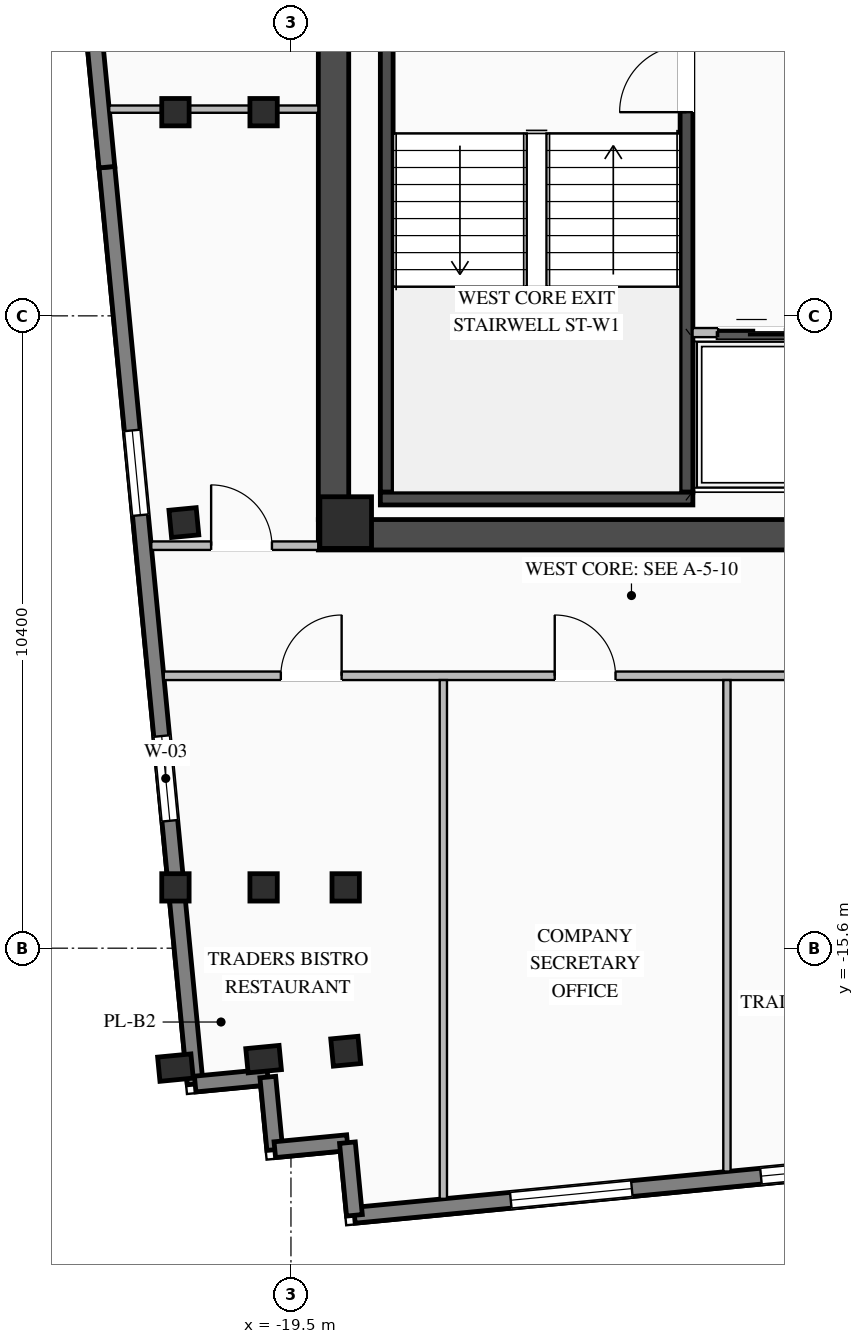
"""IFC4 building model, lengths in metres.
Left out: names, types, materials, properties, quantities, classifications, styles, units other than length and angle.
Written with IfcOpenShell. Run it as: python <this file> out.ifc"""

import sys

from ifc_helpers import new_model, si_unit, direction, frame, frame_2d, origin, origin_2d, place, context, subcontext, project, spatial, rectangle, i_section, extrude, element, fill, save


model = new_model("IFC4")
c1 = context("Model", 3, precision=1e-05, world=origin(), true_north=direction((0.0, 1.0)))
c2 = subcontext(c1, "Body", "Model", "MODEL_VIEW")
j1 = project(units=[si_unit("LENGTHUNIT", "METRE"), si_unit("PLANEANGLEUNIT", "RADIAN")], contexts=[c1])
p1 = place(None, origin())
s1 = spatial("IfcSite", under=j1, at=p1, CompositionType="ELEMENT")
p2 = place(p1, origin())
s2 = spatial("IfcBuilding", under=s1, at=p2, CompositionType="ELEMENT")
p3 = place(p2, frame((0.0, 0.0, 272.4)))
s3 = spatial("IfcBuildingStorey", under=s2, at=p3, CompositionType="ELEMENT", Elevation=272.4)
p4 = place(p3, frame((-19.05, -8.8, 0.0), z_axis=(0.0, 0.0, 1.0), x_axis=(1.0, 0.0, 0.0)))
e1 = element("IfcWall", 1, at=p4, inside=s3, PredefinedType="SHEAR", context=c2, shape_type="SweptSolid", body=[
    extrude(rectangle(XDim=10.25, YDim=0.5, at=frame_2d((5.125, 0.0))), origin(), (0.0, 0.0, 1.0), 3.27),
])
p5 = place(p3, frame((-18.8, -8.55, 0.0), z_axis=(0.0, 0.0, 1.0), x_axis=(0.0, 1.0, 0.0)))
e2 = element("IfcWall", 2, at=p5, inside=s3, PredefinedType="SHEAR", context=c2, shape_type="SweptSolid", body=[
    extrude(rectangle(XDim=17.1, YDim=0.5, at=frame_2d((8.55, 0.0))), origin(), (0.0, 0.0, 1.0), 3.27),
])
p6 = place(p3, frame((-12.995, -8.1, 0.0), z_axis=(0.0, 0.0, 1.0), x_axis=(0.0, 1.0, 0.0)))
e3 = element("IfcWall", 3, at=p6, inside=s3, PredefinedType="SHEAR", context=c2, shape_type="SweptSolid", body=[
    extrude(rectangle(XDim=8.2, YDim=0.21, at=frame_2d((4.1, 0.0))), origin(), (0.0, 0.0, 1.0), 3.27),
])
p7 = place(p6, frame((6.25, 0.0, 0.0)))
e4 = element("IfcOpeningElement", 4, at=p7, cuts=e3, PredefinedType="OPENING", context=c2, shape_type="SweptSolid", body=[
    extrude(rectangle(XDim=1.1, YDim=2.15, at=frame_2d((0.55, 1.075))), frame((0.0, 0.115, 0.0), z_axis=(0.0, -1.0, 0.0), x_axis=(1.0, 0.0, 0.0)), (0.0, 0.0, 1.0), 0.23),
])
p8 = place(p3, frame((-17.925, -8.1, 0.0), z_axis=(0.0, 0.0, 1.0), x_axis=(0.0, 1.0, 0.0)))
e5 = element("IfcWall", 5, at=p8, inside=s3, PredefinedType="SHEAR", context=c2, shape_type="SweptSolid", body=[
    extrude(rectangle(XDim=8.2, YDim=0.21, at=frame_2d((4.1, 0.0))), origin(), (0.0, 0.0, 1.0), 3.27),
])
p9 = place(p3, frame((-18.03, -8.205, 0.0), z_axis=(0.0, 0.0, 1.0), x_axis=(1.0, 0.0, 0.0)))
e6 = element("IfcWall", 6, at=p9, inside=s3, PredefinedType="SHEAR", context=c2, shape_type="SweptSolid", body=[
    extrude(rectangle(XDim=5.14, YDim=0.21, at=frame_2d((2.57, 0.0))), origin(), (0.0, 0.0, 1.0), 3.27),
])
p10 = place(p3, frame((-18.6, -8.6, 0.0), z_axis=(0.0, 0.0, 1.0), x_axis=(1.0, 0.0, 0.0)))
e7 = element("IfcColumn", 7, at=p10, inside=s3, PredefinedType="COLUMN", context=c2, shape_type="SweptSolid", body=[
    extrude(rectangle(XDim=0.85, YDim=0.85, at=origin_2d()), origin(), (0.0, 0.0, 1.0), 3.45),
])
for number, where, z_axis, x_axis in (
    (8, (-21.4, -14.6, 0.0), (0.0, 0.0, 1.0), (1.0, 0.0, 0.0)),
    (9, (-19.95, -14.6, 0.0), (0.0, 0.0, 1.0), (1.0, 0.0, 0.0)),
    (10, (-18.6, -14.6, 0.0), (0.0, 0.0, 1.0), (1.0, 0.0, 0.0)),
    (11, (-21.4, -1.85, 0.0), (0.0, 0.0, 1.0), (1.0, 0.0, 0.0)),
    (12, (-19.95, -1.85, 0.0), (0.0, 0.0, 1.0), (1.0, 0.0, 0.0)),
    (13, (-18.6, -17.295, 0.0), (0.0, 0.0, 1.0), (0.995, 0.096, 0.0)),
    (14, (-21.261, -8.6, 0.0), (0.0, 0.0, 1.0), (0.995, 0.096, 0.0)),
):
    element("IfcColumn", number, at=place(p3, frame(where, z_axis=z_axis, x_axis=x_axis)), inside=s3, PredefinedType="COLUMN", context=c2, shape_type="SweptSolid", body=[
        extrude(i_section(OverallWidth=0.45, OverallDepth=0.45, WebThickness=0.022, FlangeThickness=0.032, at=origin_2d()), origin(), (0.0, 0.0, 1.0), 3.45),
    ])
for number, where, z_axis, x_axis in (
    (15, (-21.4, -17.564, 0.0), (0.0, 0.0, 1.0), (0.995, 0.096, 0.0)),
    (16, (-19.95, -17.425, 0.0), (0.0, 0.0, 1.0), (0.995, 0.096, 0.0)),
):
    element("IfcColumn", number, at=place(p3, frame(where, z_axis=z_axis, x_axis=x_axis)), inside=s3, PredefinedType="PILASTER", context=c2, shape_type="SweptSolid", body=[
        extrude(rectangle(XDim=0.55, YDim=0.4, at=origin_2d()), origin(), (0.0, 0.0, 1.0), 3.45),
    ])
p11 = place(p3, frame((-7.756, -18.963, 0.0), z_axis=(0.0, 0.0, 1.0), x_axis=(-0.995396745868, -0.095840066339, 0.0)))
e17 = element("IfcWall", 17, at=p11, inside=s3, PredefinedType="STANDARD", context=c2, shape_type="SweptSolid", body=[
    extrude(rectangle(XDim=10.75, YDim=0.26, at=frame_2d((5.375, 0.0))), origin(), (0.0, 0.0, 1.0), 3.25),
])
p12 = place(p11, frame((2.033, 0.0, 0.76)))
e18 = element("IfcOpeningElement", 18, at=p12, cuts=e17, PredefinedType="OPENING", context=c2, shape_type="SweptSolid", body=[
    extrude(rectangle(XDim=2.0, YDim=2.05, at=frame_2d((1.0, 1.025))), frame((0.0, 0.14, 0.0), z_axis=(0.0, -1.0, 0.0), x_axis=(1.0, 0.0, 0.0)), (0.0, 0.0, 1.0), 0.28),
])
p13 = place(p11, frame((6.167, 0.0, 0.76)))
e19 = element("IfcOpeningElement", 19, at=p13, cuts=e17, PredefinedType="OPENING", context=c2, shape_type="SweptSolid", body=[
    extrude(rectangle(XDim=2.0, YDim=2.05, at=frame_2d((1.0, 1.025))), frame((0.0, 0.14, 0.0), z_axis=(0.0, -1.0, 0.0), x_axis=(1.0, 0.0, 0.0)), (0.0, 0.0, 1.0), 0.28),
])
p14 = place(p3, frame((-21.075, -17.834, 0.0), z_axis=(0.0, 0.0, 1.0), x_axis=(-0.095852427869, 0.995395555582, 0.0)))
e20 = element("IfcWall", 20, at=p14, inside=s3, PredefinedType="STANDARD", context=c2, shape_type="SweptSolid", body=[
    extrude(rectangle(XDim=15.15, YDim=0.26, at=frame_2d((7.575, 0.0))), origin(), (0.0, 0.0, 1.0), 2.645),
])
p15 = place(p14, frame((4.35, 0.0, 0.535)))
e21 = element("IfcOpeningElement", 21, at=p15, cuts=e20, PredefinedType="OPENING", context=c2, shape_type="SweptSolid", body=[
    extrude(rectangle(XDim=1.4, YDim=1.95, at=frame_2d((0.7, 0.975))), frame((0.0, 0.14, 0.0), z_axis=(0.0, -1.0, 0.0), x_axis=(1.0, 0.0, 0.0)), (0.0, 0.0, 1.0), 0.28),
])
p16 = place(p14, frame((9.4, 0.0, 0.535)))
e22 = element("IfcOpeningElement", 22, at=p16, cuts=e20, PredefinedType="OPENING", context=c2, shape_type="SweptSolid", body=[
    extrude(rectangle(XDim=1.4, YDim=1.95, at=frame_2d((0.7, 0.975))), frame((0.0, 0.14, 0.0), z_axis=(0.0, -1.0, 0.0), x_axis=(1.0, 0.0, 0.0)), (0.0, 0.0, 1.0), 0.28),
])
p17 = place(p3, frame((-22.527, -2.754, 0.0), z_axis=(0.0, 0.0, 1.0), x_axis=(-0.095850890337, 0.995395703638, 0.0)))
e23 = element("IfcWall", 23, at=p17, inside=s3, PredefinedType="STANDARD", context=c2, shape_type="SweptSolid", body=[
    extrude(rectangle(XDim=15.15, YDim=0.26, at=frame_2d((7.575, 0.0))), origin(), (0.0, 0.0, 1.0), 3.25),
])
p18 = place(p17, frame((4.35, 0.0, 0.76)))
e24 = element("IfcOpeningElement", 24, at=p18, cuts=e23, PredefinedType="OPENING", context=c2, shape_type="SweptSolid", body=[
    extrude(rectangle(XDim=1.4, YDim=1.95, at=frame_2d((0.7, 0.975))), frame((0.0, 0.14, 0.0), z_axis=(0.0, -1.0, 0.0), x_axis=(1.0, 0.0, 0.0)), (0.0, 0.0, 1.0), 0.28),
])
p19 = place(p17, frame((9.4, 0.0, 0.76)))
e25 = element("IfcOpeningElement", 25, at=p19, cuts=e23, PredefinedType="OPENING", context=c2, shape_type="SweptSolid", body=[
    extrude(rectangle(XDim=1.4, YDim=1.95, at=frame_2d((0.7, 0.975))), frame((0.0, 0.14, 0.0), z_axis=(0.0, -1.0, 0.0), x_axis=(1.0, 0.0, 0.0)), (0.0, 0.0, 1.0), 0.28),
])
p20 = place(p3, frame((-21.075, -17.834, 0.0), z_axis=(0.0, 0.0, 1.0), x_axis=(0.995397091755, 0.095836473879, 0.0)))
e26 = element("IfcWall", 26, at=p20, inside=s3, PredefinedType="STANDARD", context=c2, shape_type="SweptSolid", body=[
    extrude(rectangle(XDim=1.2, YDim=0.26, at=frame_2d((0.6, 0.0))), origin(), (0.0, 0.0, 1.0), 2.645),
])
for number, where, z_axis, x_axis in (
    (27, (-19.881, -17.719, 0.0), (0.0, 0.0, 1.0), (0.096, -0.995, 0.0)),
    (28, (-19.766, -18.914, 0.0), (0.0, 0.0, 1.0), (0.995, 0.096, 0.0)),
):
    element("IfcWall", number, at=place(p3, frame(where, z_axis=z_axis, x_axis=x_axis)), inside=s3, PredefinedType="STANDARD", context=c2, shape_type="SweptSolid", body=[
        extrude(rectangle(XDim=1.2, YDim=0.26, at=frame_2d((0.6, 0.0))), origin(), (0.0, 0.0, 1.0), 2.645),
    ])
p21 = place(p3, frame((-18.571, -18.799, 0.0), z_axis=(0.0, 0.0, 1.0), x_axis=(0.095836473879, -0.995397091755, 0.0)))
e29 = element("IfcWall", 29, at=p21, inside=s3, PredefinedType="STANDARD", context=c2, shape_type="SweptSolid", body=[
    extrude(rectangle(XDim=1.2, YDim=0.26, at=frame_2d((0.6, 0.0))), origin(), (0.0, 0.0, 1.0), 2.645),
])
p22 = place(p3, frame((-12.895, -5.475, 0.0), z_axis=(0.0, 0.0, 1.0), x_axis=(1.0, 0.0, 0.0)))
e30 = element("IfcWall", 30, at=p22, inside=s3, PredefinedType="STANDARD", context=c2, shape_type="SweptSolid", body=[
    extrude(rectangle(XDim=3.595, YDim=0.15, at=frame_2d((1.797, 0.0))), origin(), (0.0, 0.0, 1.0), 3.25),
])
p23 = place(p22, frame((0.42, 0.0, 0.0)))
e31 = element("IfcOpeningElement", 31, at=p23, cuts=e30, PredefinedType="OPENING", context=c2, shape_type="SweptSolid", body=[
    extrude(rectangle(XDim=1.1, YDim=2.15, at=frame_2d((0.55, 1.075))), frame((0.0, 0.085, 0.0), z_axis=(0.0, -1.0, 0.0), x_axis=(1.0, 0.0, 0.0)), (0.0, 0.0, 1.0), 0.17),
])
p24 = place(p22, frame((2.37, 0.0, 0.0)))
e32 = element("IfcOpeningElement", 32, at=p24, cuts=e30, PredefinedType="OPENING", context=c2, shape_type="SweptSolid", body=[
    extrude(rectangle(XDim=0.75, YDim=2.05, at=frame_2d((0.375, 1.025))), frame((0.0, 0.085, 0.0), z_axis=(0.0, -1.0, 0.0), x_axis=(1.0, 0.0, 0.0)), (0.0, 0.0, 1.0), 0.17),
])
p25 = place(p3, frame((-21.591, -11.12, 0.0), z_axis=(0.0, 0.0, 1.0), x_axis=(1.0, 0.0, 0.0)))
e33 = element("IfcWall", 33, at=p25, inside=s3, PredefinedType="STANDARD", context=c2, shape_type="SweptSolid", body=[
    extrude(rectangle(XDim=53.285, YDim=0.14, at=frame_2d((26.643, 0.0))), origin(), (0.0, 0.0, 1.0), 3.25),
])
p26 = place(p25, frame((14.681, 0.0, 0.0)))
e34 = element("IfcOpeningElement", 34, at=p26, cuts=e33, PredefinedType="OPENING", context=c2, shape_type="SweptSolid", body=[
    extrude(rectangle(XDim=0.92, YDim=2.08, at=frame_2d((0.46, 1.04))), frame((0.0, 0.08, 0.0), z_axis=(0.0, -1.0, 0.0), x_axis=(1.0, 0.0, 0.0)), (0.0, 0.0, 1.0), 0.16),
])
p27 = place(p25, frame((18.181, 0.0, 0.0)))
e35 = element("IfcOpeningElement", 35, at=p27, cuts=e33, PredefinedType="OPENING", context=c2, shape_type="SweptSolid", body=[
    extrude(rectangle(XDim=0.92, YDim=2.08, at=frame_2d((0.46, 1.04))), frame((0.0, 0.08, 0.0), z_axis=(0.0, -1.0, 0.0), x_axis=(1.0, 0.0, 0.0)), (0.0, 0.0, 1.0), 0.16),
])
p28 = place(p25, frame((21.031, 0.0, 0.0)))
e36 = element("IfcOpeningElement", 36, at=p28, cuts=e33, PredefinedType="OPENING", context=c2, shape_type="SweptSolid", body=[
    extrude(rectangle(XDim=0.92, YDim=2.08, at=frame_2d((0.46, 1.04))), frame((0.0, 0.08, 0.0), z_axis=(0.0, -1.0, 0.0), x_axis=(1.0, 0.0, 0.0)), (0.0, 0.0, 1.0), 0.16),
])
p29 = place(p25, frame((1.925, 0.0, 0.0)))
e37 = element("IfcOpeningElement", 37, at=p29, cuts=e33, PredefinedType="OPENING", context=c2, shape_type="SweptSolid", body=[
    extrude(rectangle(XDim=1.0, YDim=2.08, at=frame_2d((0.5, 1.04))), frame((0.0, 0.08, 0.0), z_axis=(0.0, -1.0, 0.0), x_axis=(1.0, 0.0, 0.0)), (0.0, 0.0, 1.0), 0.16),
])
p30 = place(p25, frame((6.429, 0.0, 0.0)))
e38 = element("IfcOpeningElement", 38, at=p30, cuts=e33, PredefinedType="OPENING", context=c2, shape_type="SweptSolid", body=[
    extrude(rectangle(XDim=1.0, YDim=2.08, at=frame_2d((0.5, 1.04))), frame((0.0, 0.08, 0.0), z_axis=(0.0, -1.0, 0.0), x_axis=(1.0, 0.0, 0.0)), (0.0, 0.0, 1.0), 0.16),
])
p31 = place(p25, frame((10.826, 0.0, 0.0)))
e39 = element("IfcOpeningElement", 39, at=p31, cuts=e33, PredefinedType="OPENING", context=c2, shape_type="SweptSolid", body=[
    extrude(rectangle(XDim=1.0, YDim=2.08, at=frame_2d((0.5, 1.04))), frame((0.0, 0.08, 0.0), z_axis=(0.0, -1.0, 0.0), x_axis=(1.0, 0.0, 0.0)), (0.0, 0.0, 1.0), 0.16),
])
p32 = place(p25, frame((27.322, 0.0, 0.0)))
e40 = element("IfcOpeningElement", 40, at=p32, cuts=e33, PredefinedType="OPENING", context=c2, shape_type="SweptSolid", body=[
    extrude(rectangle(XDim=1.0, YDim=2.08, at=frame_2d((0.5, 1.04))), frame((0.0, 0.08, 0.0), z_axis=(0.0, -1.0, 0.0), x_axis=(1.0, 0.0, 0.0)), (0.0, 0.0, 1.0), 0.16),
])
p33 = place(p25, frame((37.939, 0.0, 0.0)))
e41 = element("IfcOpeningElement", 41, at=p33, cuts=e33, PredefinedType="OPENING", context=c2, shape_type="SweptSolid", body=[
    extrude(rectangle(XDim=1.0, YDim=2.08, at=frame_2d((0.5, 1.04))), frame((0.0, 0.08, 0.0), z_axis=(0.0, -1.0, 0.0), x_axis=(1.0, 0.0, 0.0)), (0.0, 0.0, 1.0), 0.16),
])
p34 = place(p25, frame((47.929, 0.0, 0.0)))
e42 = element("IfcOpeningElement", 42, at=p34, cuts=e33, PredefinedType="OPENING", context=c2, shape_type="SweptSolid", body=[
    extrude(rectangle(XDim=1.0, YDim=2.08, at=frame_2d((0.5, 1.04))), frame((0.0, 0.08, 0.0), z_axis=(0.0, -1.0, 0.0), x_axis=(1.0, 0.0, 0.0)), (0.0, 0.0, 1.0), 0.16),
])
p35 = place(p3, frame((-16.994, -19.722, 0.0), z_axis=(0.0, 0.0, 1.0), x_axis=(0.0, 1.0, 0.0)))
e43 = element("IfcWall", 43, at=p35, inside=s3, PredefinedType="STANDARD", context=c2, shape_type="SweptSolid", body=[
    extrude(rectangle(XDim=8.532, YDim=0.12, at=frame_2d((4.266, 0.0))), origin(), (0.0, 0.0, 1.0), 3.25),
])
p36 = place(p3, frame((-12.33, -19.273, 0.0), z_axis=(0.0, 0.0, 1.0), x_axis=(0.0, 1.0, 0.0)))
e44 = element("IfcWall", 44, at=p36, inside=s3, PredefinedType="STANDARD", context=c2, shape_type="SweptSolid", body=[
    extrude(rectangle(XDim=8.083, YDim=0.12, at=frame_2d((4.042, 0.0))), origin(), (0.0, 0.0, 1.0), 3.25),
])
p37 = place(p3, frame((-21.797, -8.98, 0.0), z_axis=(0.0, 0.0, 1.0), x_axis=(1.0, 0.0, 0.0)))
e45 = element("IfcWall", 45, at=p37, inside=s3, PredefinedType="STANDARD", context=c2, shape_type="SweptSolid", body=[
    extrude(rectangle(XDim=2.747, YDim=0.14, at=frame_2d((1.374, 0.0))), origin(), (0.0, 0.0, 1.0), 3.25),
])
p38 = place(p37, frame((0.984, 0.0, 0.0)))
e46 = element("IfcOpeningElement", 46, at=p38, cuts=e45, PredefinedType="OPENING", context=c2, shape_type="SweptSolid", body=[
    extrude(rectangle(XDim=1.0, YDim=2.08, at=frame_2d((0.5, 1.04))), frame((0.0, 0.08, 0.0), z_axis=(0.0, -1.0, 0.0), x_axis=(1.0, 0.0, 0.0)), (0.0, 0.0, 1.0), 0.16),
])
p39 = place(p3, frame((-22.489, -1.8, 0.0), z_axis=(0.0, 0.0, 1.0), x_axis=(1.0, 0.0, 0.0)))
e47 = element("IfcWall", 47, at=p39, inside=s3, PredefinedType="STANDARD", context=c2, shape_type="SweptSolid", body=[
    extrude(rectangle(XDim=3.438, YDim=0.12, at=frame_2d((1.719, 0.0))), origin(), (0.0, 0.0, 1.0), 3.25),
])
p40 = place(p12, origin())
e48 = element("IfcWindow", 48, at=p40, inside=s3, PartitioningType="DOUBLE_PANEL_VERTICAL", PredefinedType="WINDOW", context=c2, shape_type="SweptSolid", body=[
    extrude(rectangle(XDim=2.0, YDim=2.05, at=frame_2d((1.0, 1.025))), frame((0.0, 0.03, 0.0), z_axis=(0.0, -1.0, 0.0), x_axis=(1.0, 0.0, 0.0)), (0.0, 0.0, 1.0), 0.06),
])
fill(e18, e48)
p41 = place(p13, origin())
e49 = element("IfcWindow", 49, at=p41, inside=s3, PartitioningType="DOUBLE_PANEL_VERTICAL", PredefinedType="WINDOW", context=c2, shape_type="SweptSolid", body=[
    extrude(rectangle(XDim=2.0, YDim=2.05, at=frame_2d((1.0, 1.025))), frame((0.0, 0.03, 0.0), z_axis=(0.0, -1.0, 0.0), x_axis=(1.0, 0.0, 0.0)), (0.0, 0.0, 1.0), 0.06),
])
fill(e19, e49)
p42 = place(p15, origin())
e50 = element("IfcWindow", 50, at=p42, inside=s3, PartitioningType="SINGLE_PANEL", PredefinedType="WINDOW", context=c2, shape_type="SweptSolid", body=[
    extrude(rectangle(XDim=1.4, YDim=1.95, at=frame_2d((0.7, 0.975))), frame((0.0, 0.03, 0.0), z_axis=(0.0, -1.0, 0.0), x_axis=(1.0, 0.0, 0.0)), (0.0, 0.0, 1.0), 0.06),
])
fill(e21, e50)
p43 = place(p16, origin())
e51 = element("IfcWindow", 51, at=p43, inside=s3, PartitioningType="SINGLE_PANEL", PredefinedType="WINDOW", context=c2, shape_type="SweptSolid", body=[
    extrude(rectangle(XDim=1.4, YDim=1.95, at=frame_2d((0.7, 0.975))), frame((0.0, 0.03, 0.0), z_axis=(0.0, -1.0, 0.0), x_axis=(1.0, 0.0, 0.0)), (0.0, 0.0, 1.0), 0.06),
])
fill(e22, e51)
p44 = place(p7, origin())
e52 = element("IfcDoor", 52, at=p44, inside=s3, OperationType="SINGLE_SWING_LEFT", PredefinedType="DOOR", context=c2, shape_type="SweptSolid", body=[
    extrude(rectangle(XDim=1.1, YDim=2.15, at=frame_2d((0.55, 1.075))), frame((0.0, 0.025, 0.0), z_axis=(0.0, -1.0, 0.0), x_axis=(1.0, 0.0, 0.0)), (0.0, 0.0, 1.0), 0.05),
])
fill(e4, e52)
p45 = place(p23, origin())
e53 = element("IfcDoor", 53, at=p45, inside=s3, OperationType="DOUBLE_DOOR_SLIDING", PredefinedType="DOOR", context=c2, shape_type="SweptSolid", body=[
    extrude(rectangle(XDim=1.1, YDim=2.15, at=frame_2d((0.55, 1.075))), frame((0.0, 0.025, 0.0), z_axis=(0.0, -1.0, 0.0), x_axis=(1.0, 0.0, 0.0)), (0.0, 0.0, 1.0), 0.05),
])
fill(e31, e53)
p46 = place(p29, origin())
e54 = element("IfcDoor", 54, at=p46, inside=s3, OperationType="SINGLE_SWING_RIGHT", PredefinedType="DOOR", context=c2, shape_type="SweptSolid", body=[
    extrude(rectangle(XDim=1.0, YDim=2.08, at=frame_2d((0.5, 1.04))), frame((0.0, 0.025, 0.0), z_axis=(0.0, -1.0, 0.0), x_axis=(1.0, 0.0, 0.0)), (0.0, 0.0, 1.0), 0.05),
])
fill(e37, e54)
p47 = place(p30, origin())
e55 = element("IfcDoor", 55, at=p47, inside=s3, OperationType="SINGLE_SWING_LEFT", PredefinedType="DOOR", context=c2, shape_type="SweptSolid", body=[
    extrude(rectangle(XDim=1.0, YDim=2.08, at=frame_2d((0.5, 1.04))), frame((0.0, 0.025, 0.0), z_axis=(0.0, -1.0, 0.0), x_axis=(1.0, 0.0, 0.0)), (0.0, 0.0, 1.0), 0.05),
])
fill(e38, e55)
p48 = place(p38, origin())
e56 = element("IfcDoor", 56, at=p48, inside=s3, OperationType="SINGLE_SWING_LEFT", PredefinedType="DOOR", context=c2, shape_type="SweptSolid", body=[
    extrude(rectangle(XDim=1.0, YDim=2.08, at=frame_2d((0.5, 1.04))), frame((0.0, 0.025, 0.0), z_axis=(0.0, -1.0, 0.0), x_axis=(1.0, 0.0, 0.0)), (0.0, 0.0, 1.0), 0.05),
])
fill(e46, e56)
save(model, sys.argv[1])
